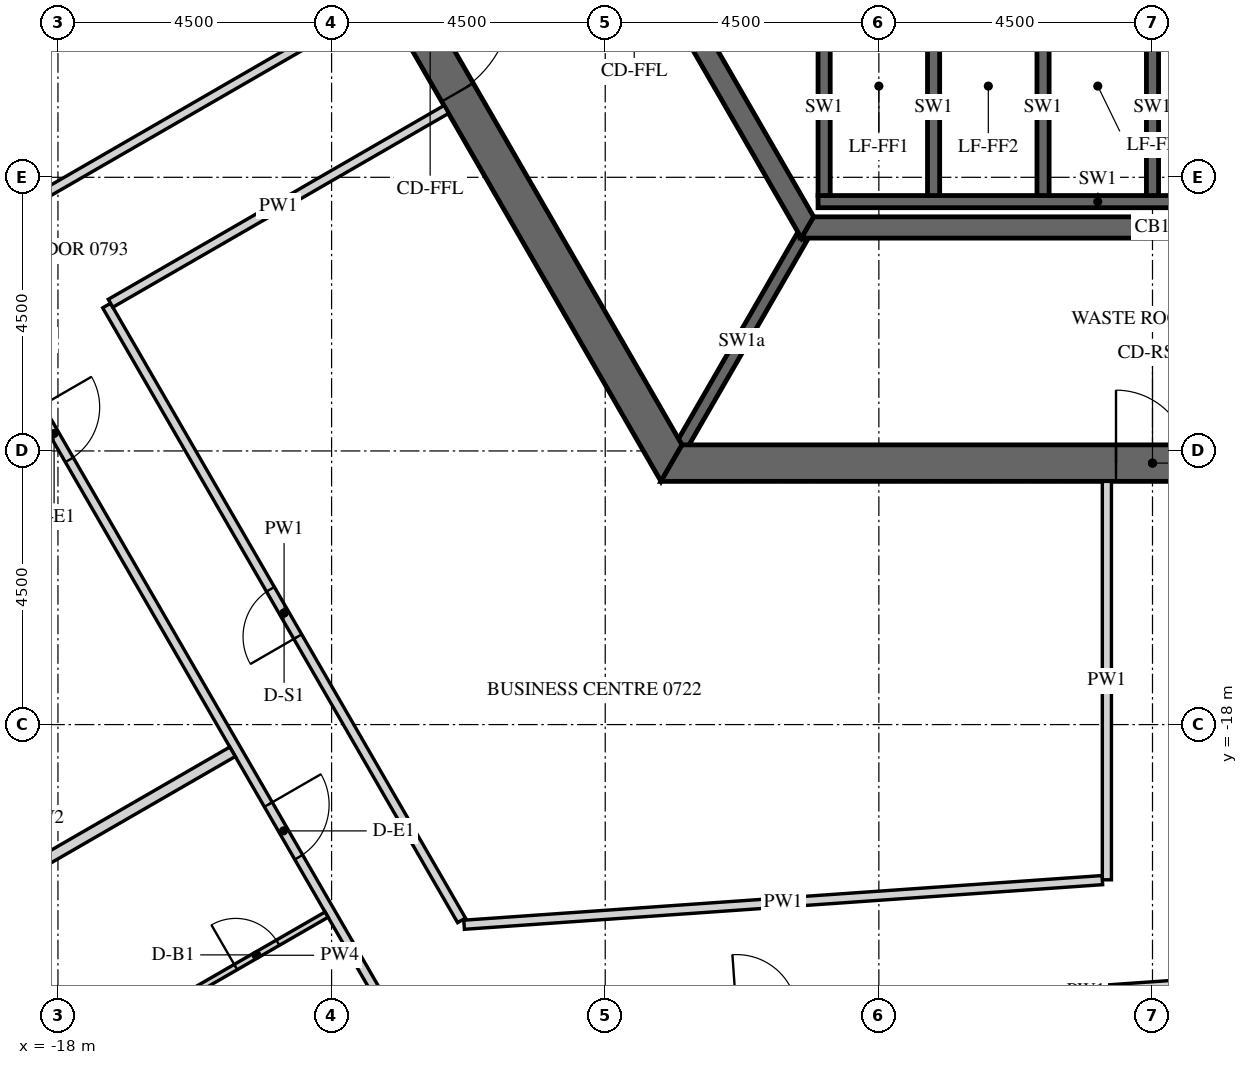
"""IFC4 building model, lengths in metres.
Left out: names, types, materials, properties, quantities, classifications, styles, units other than length and angle.
Written with IfcOpenShell. Run it as: python <this file> out.ifc"""

import sys

from ifc_helpers import new_model, si_unit, direction, frame, frame_2d, origin, place, context, subcontext, project, spatial, polyline, rectangle, outline, extrude, element, fill, save


model = new_model("IFC4")
c1 = context("Model", 3, precision=1e-05, world=origin(), true_north=direction((0.0, 1.0)))
c2 = subcontext(c1, "Body", "Model", "MODEL_VIEW")
j1 = project(units=[si_unit("LENGTHUNIT", "METRE"), si_unit("PLANEANGLEUNIT", "RADIAN")], contexts=[c1])
p1 = place(None, origin())
s1 = spatial("IfcSite", under=j1, at=p1, CompositionType="ELEMENT")
p2 = place(p1, origin())
s2 = spatial("IfcBuilding", under=s1, at=p2, CompositionType="ELEMENT")
p3 = place(p2, frame((0.0, 0.0, 99.9)))
s3 = spatial("IfcBuildingStorey", under=s2, at=p3, CompositionType="ELEMENT", Elevation=99.9)
p4 = place(p3, frame((-32.655, -2.89, -0.15), z_axis=(0.0, 0.0, 1.0), x_axis=(0.499997711317, -0.866026725152, 0.0)))
e1 = element("IfcWall", 1, at=p4, inside=s3, PredefinedType="SOLIDWALL", context=c2, shape_type="SweptSolid", body=[
    extrude(outline(polyline([(-0.022, -0.275), (30.097, -0.275), (30.045, 0.275), (0.022, 0.275), (-0.022, -0.275)])), origin(), (0.0, 0.0, 1.0), 3.9),
])
p5 = place(p4, frame((1.236, 0.0, 1.05)))
e2 = element("IfcOpeningElement", 2, at=p5, cuts=e1, PredefinedType="OPENING", context=c2, shape_type="SweptSolid", body=[
    extrude(rectangle(XDim=2.4, YDim=2.4, at=frame_2d((1.2, 1.2))), frame((0.0, 0.285, 0.0), z_axis=(0.0, -1.0, 0.0), x_axis=(1.0, 0.0, 0.0)), (0.0, 0.0, 1.0), 0.57),
])
p6 = place(p4, frame((4.835, 0.0, 1.05)))
e3 = element("IfcOpeningElement", 3, at=p6, cuts=e1, PredefinedType="OPENING", context=c2, shape_type="SweptSolid", body=[
    extrude(rectangle(XDim=2.4, YDim=2.4, at=frame_2d((1.2, 1.2))), frame((0.0, 0.285, 0.0), z_axis=(0.0, -1.0, 0.0), x_axis=(1.0, 0.0, 0.0)), (0.0, 0.0, 1.0), 0.57),
])
p7 = place(p4, frame((8.436, 0.0, 1.05)))
e4 = element("IfcOpeningElement", 4, at=p7, cuts=e1, PredefinedType="OPENING", context=c2, shape_type="SweptSolid", body=[
    extrude(rectangle(XDim=2.4, YDim=2.4, at=frame_2d((1.2, 1.2))), frame((0.0, 0.285, 0.0), z_axis=(0.0, -1.0, 0.0), x_axis=(1.0, 0.0, 0.0)), (0.0, 0.0, 1.0), 0.57),
])
p8 = place(p4, frame((12.035, 0.0, 1.05)))
e5 = element("IfcOpeningElement", 5, at=p8, cuts=e1, PredefinedType="OPENING", context=c2, shape_type="SweptSolid", body=[
    extrude(rectangle(XDim=2.4, YDim=2.4, at=frame_2d((1.2, 1.2))), frame((0.0, 0.285, 0.0), z_axis=(0.0, -1.0, 0.0), x_axis=(1.0, 0.0, 0.0)), (0.0, 0.0, 1.0), 0.57),
])
p9 = place(p4, frame((15.635, 0.0, 1.05)))
e6 = element("IfcOpeningElement", 6, at=p9, cuts=e1, PredefinedType="OPENING", context=c2, shape_type="SweptSolid", body=[
    extrude(rectangle(XDim=2.4, YDim=2.4, at=frame_2d((1.2, 1.2))), frame((0.0, 0.285, 0.0), z_axis=(0.0, -1.0, 0.0), x_axis=(1.0, 0.0, 0.0)), (0.0, 0.0, 1.0), 0.57),
])
p10 = place(p4, frame((19.236, 0.0, 1.05)))
e7 = element("IfcOpeningElement", 7, at=p10, cuts=e1, PredefinedType="OPENING", context=c2, shape_type="SweptSolid", body=[
    extrude(rectangle(XDim=2.4, YDim=2.4, at=frame_2d((1.2, 1.2))), frame((0.0, 0.285, 0.0), z_axis=(0.0, -1.0, 0.0), x_axis=(1.0, 0.0, 0.0)), (0.0, 0.0, 1.0), 0.57),
])
p11 = place(p4, frame((22.835, 0.0, 1.05)))
e8 = element("IfcOpeningElement", 8, at=p11, cuts=e1, PredefinedType="OPENING", context=c2, shape_type="SweptSolid", body=[
    extrude(rectangle(XDim=2.4, YDim=2.4, at=frame_2d((1.2, 1.2))), frame((0.0, 0.285, 0.0), z_axis=(0.0, -1.0, 0.0), x_axis=(1.0, 0.0, 0.0)), (0.0, 0.0, 1.0), 0.57),
])
p12 = place(p4, frame((26.436, 0.0, 1.05)))
e9 = element("IfcOpeningElement", 9, at=p12, cuts=e1, PredefinedType="OPENING", context=c2, shape_type="SweptSolid", body=[
    extrude(rectangle(XDim=2.4, YDim=2.4, at=frame_2d((1.2, 1.2))), frame((0.0, 0.285, 0.0), z_axis=(0.0, -1.0, 0.0), x_axis=(1.0, 0.0, 0.0)), (0.0, 0.0, 1.0), 0.57),
])
p13 = place(p3, frame((-15.819, 0.0, -0.15), z_axis=(0.0, 0.0, 1.0), x_axis=(0.499999880136, -0.866025472988, 0.0)))
e10 = element("IfcWall", 10, at=p13, inside=s3, PredefinedType="SHEAR", context=c2, shape_type="SweptSolid", body=[
    extrude(outline(polyline([(-0.173, -0.3), (15.993, -0.3), (15.646, 0.3), (0.173, 0.3), (-0.173, -0.3)])), origin(), (0.0, 0.0, 1.0), 3.9),
])
p14 = place(p13, frame((6.981, 0.0, 0.15)))
e11 = element("IfcOpeningElement", 11, at=p14, cuts=e10, PredefinedType="OPENING", context=c2, shape_type="SweptSolid", body=[
    extrude(rectangle(XDim=1.8, YDim=2.4, at=frame_2d((0.9, 1.2))), frame((0.0, 0.31, 0.0), z_axis=(0.0, -1.0, 0.0), x_axis=(1.0, 0.0, 0.0)), (0.0, 0.0, 1.0), 0.62),
])
p15 = place(p3, frame((-7.91, -13.7, -0.15), z_axis=(0.0, 0.0, 1.0), x_axis=(1.0, 0.0, 0.0)))
e12 = element("IfcWall", 12, at=p15, inside=s3, PredefinedType="SHEAR", context=c2, shape_type="SweptSolid", body=[
    extrude(outline(polyline([(-0.173, -0.3), (15.993, -0.3), (15.646, 0.3), (0.173, 0.3), (-0.173, -0.3)])), origin(), (0.0, 0.0, 1.0), 3.9),
])
p16 = place(p15, frame((7.31, 0.0, 0.15)))
e13 = element("IfcOpeningElement", 13, at=p16, cuts=e12, PredefinedType="OPENING", context=c2, shape_type="SweptSolid", body=[
    extrude(rectangle(XDim=1.2, YDim=2.4, at=frame_2d((0.6, 1.2))), frame((0.0, 0.31, 0.0), z_axis=(0.0, -1.0, 0.0), x_axis=(1.0, 0.0, 0.0)), (0.0, 0.0, 1.0), 0.62),
])
p17 = place(p3, frame((-11.345, 0.0, -0.15), z_axis=(0.0, 0.0, 1.0), x_axis=(0.499995046907, -0.866028263435, 0.0)))
e14 = element("IfcWall", 14, at=p17, inside=s3, PredefinedType="SHEAR", context=c2, shape_type="SweptSolid", body=[
    extrude(outline(polyline([(-0.101, -0.175), (11.446, -0.175), (11.244, 0.175), (0.101, 0.175), (-0.101, -0.175)])), origin(), (0.0, 0.0, 1.0), 3.9),
])
p18 = place(p17, frame((4.744, 0.0, 0.15)))
e15 = element("IfcOpeningElement", 15, at=p18, cuts=e14, PredefinedType="OPENING", context=c2, shape_type="SweptSolid", body=[
    extrude(rectangle(XDim=1.8, YDim=2.4, at=frame_2d((0.9, 1.2))), frame((0.0, 0.185, 0.0), z_axis=(0.0, -1.0, 0.0), x_axis=(1.0, 0.0, 0.0)), (0.0, 0.0, 1.0), 0.37),
])
p19 = place(p3, frame((-5.673, -9.825, -0.15), z_axis=(0.0, 0.0, 1.0), x_axis=(1.0, 0.0, 0.0)))
e16 = element("IfcWall", 16, at=p19, inside=s3, PredefinedType="SHEAR", context=c2, shape_type="SweptSolid", body=[
    extrude(outline(polyline([(-0.101, -0.175), (11.446, -0.175), (11.244, 0.175), (0.101, 0.175), (-0.101, -0.175)])), origin(), (0.0, 0.0, 1.0), 3.9),
])
p20 = place(p3, frame((-5.5, -9.4, -0.25), z_axis=(0.0, 0.0, 1.0), x_axis=(1.0, 0.0, 0.0)))
e17 = element("IfcWall", 17, at=p20, inside=s3, PredefinedType="SHEAR", context=c2, shape_type="SweptSolid", body=[
    extrude(rectangle(XDim=9.2, YDim=0.2, at=frame_2d((4.6, 0.0))), origin(), (0.0, 0.0, 1.0), 3.9),
])
for number, where, z_axis, x_axis in (
    (18, (-5.4, -9.3, -0.25), (0.0, 0.0, 1.0), (0.0, 1.0, 0.0)),
    (19, (-3.6, -9.3, -0.25), (0.0, 0.0, 1.0), (0.0, 1.0, 0.0)),
    (20, (-1.8, -9.3, -0.25), (0.0, 0.0, 1.0), (0.0, 1.0, 0.0)),
    (21, (0.0, -9.3, -0.25), (0.0, 0.0, 1.0), (0.0, 1.0, 0.0)),
):
    element("IfcWall", number, at=place(p3, frame(where, z_axis=z_axis, x_axis=x_axis)), inside=s3, PredefinedType="SHEAR", context=c2, shape_type="SweptSolid", body=[
        extrude(rectangle(XDim=2.9, YDim=0.2, at=frame_2d((1.45, 0.0))), origin(), (0.0, 0.0, 1.0), 3.9),
    ])
p21 = place(p3, frame((-5.773, -10.0, -0.15), z_axis=(0.0, 0.0, 1.0), x_axis=(-0.500038251005, -0.86600331843, 0.0)))
e22 = element("IfcWall", 22, at=p21, inside=s3, PredefinedType="SHEAR", context=c2, shape_type="SweptSolid", body=[
    extrude(rectangle(XDim=3.926, YDim=0.2, at=frame_2d((1.963, 0.0))), origin(), (0.0, 0.0, 1.0), 3.9),
])
p22 = place(p3, frame((-24.436, -2.175, 0.0), z_axis=(0.0, 0.0, 1.0), x_axis=(0.499996816197, -0.866027241946, 0.0)))
e23 = element("IfcWall", 23, at=p22, inside=s3, PredefinedType="PARTITIONING", context=c2, shape_type="SweptSolid", body=[
    extrude(rectangle(XDim=24.238, YDim=0.15, at=frame_2d((12.119, 0.0))), origin(), (0.0, 0.0, 1.0), 2.988),
])
p23 = place(p22, frame((0.179, 0.0, 0.0)))
e24 = element("IfcOpeningElement", 24, at=p23, cuts=e23, PredefinedType="OPENING", context=c2, shape_type="SweptSolid", body=[
    extrude(rectangle(XDim=1.0, YDim=2.1, at=frame_2d((0.5, 1.05))), frame((0.0, 0.085, 0.0), z_axis=(0.0, -1.0, 0.0), x_axis=(1.0, 0.0, 0.0)), (0.0, 0.0, 1.0), 0.17),
])
p24 = place(p22, frame((12.246, 0.0, 0.0)))
e25 = element("IfcOpeningElement", 25, at=p24, cuts=e23, PredefinedType="OPENING", context=c2, shape_type="SweptSolid", body=[
    extrude(rectangle(XDim=1.0, YDim=2.1, at=frame_2d((0.5, 1.05))), frame((0.0, 0.085, 0.0), z_axis=(0.0, -1.0, 0.0), x_axis=(1.0, 0.0, 0.0)), (0.0, 0.0, 1.0), 0.17),
])
p25 = place(p22, frame((19.792, 0.0, 0.0)))
e26 = element("IfcOpeningElement", 26, at=p25, cuts=e23, PredefinedType="OPENING", context=c2, shape_type="SweptSolid", body=[
    extrude(rectangle(XDim=1.0, YDim=2.1, at=frame_2d((0.5, 1.05))), frame((0.0, 0.085, 0.0), z_axis=(0.0, -1.0, 0.0), x_axis=(1.0, 0.0, 0.0)), (0.0, 0.0, 1.0), 0.17),
])
p26 = place(p3, frame((-12.234, -23.16, 0.0), z_axis=(0.0, 0.0, 1.0), x_axis=(0.997563845372, 0.069759403714, 0.0)))
e27 = element("IfcWall", 27, at=p26, inside=s3, PredefinedType="PARTITIONING", context=c2, shape_type="SweptSolid", body=[
    extrude(rectangle(XDim=22.335, YDim=0.15, at=frame_2d((11.168, 0.0))), origin(), (0.0, 0.0, 1.0), 2.988),
])
p27 = place(p26, frame((5.409, 0.0, 0.0)))
e28 = element("IfcOpeningElement", 28, at=p27, cuts=e27, PredefinedType="OPENING", context=c2, shape_type="SweptSolid", body=[
    extrude(rectangle(XDim=1.0, YDim=2.1, at=frame_2d((0.5, 1.05))), frame((0.0, 0.085, 0.0), z_axis=(0.0, -1.0, 0.0), x_axis=(1.0, 0.0, 0.0)), (0.0, 0.0, 1.0), 0.17),
])
p28 = place(p26, frame((18.272, 0.0, 0.0)))
e29 = element("IfcOpeningElement", 29, at=p28, cuts=e27, PredefinedType="OPENING", context=c2, shape_type="SweptSolid", body=[
    extrude(rectangle(XDim=1.0, YDim=2.1, at=frame_2d((0.5, 1.05))), frame((0.0, 0.085, 0.0), z_axis=(0.0, -1.0, 0.0), x_axis=(1.0, 0.0, 0.0)), (0.0, 0.0, 1.0), 0.17),
])
p29 = place(p3, frame((-12.664, -6.066, 0.0), z_axis=(0.0, 0.0, 1.0), x_axis=(-0.866021702275, -0.500006411147, 0.0)))
e30 = element("IfcWall", 30, at=p29, inside=s3, PredefinedType="PARTITIONING", context=c2, shape_type="SweptSolid", body=[
    extrude(rectangle(XDim=6.45, YDim=0.15, at=frame_2d((3.225, 0.0))), origin(), (0.0, 0.0, 1.0), 2.988),
])
p30 = place(p3, frame((-0.75, -14.0, 0.0), z_axis=(0.0, 0.0, 1.0), x_axis=(0.0, -1.0, 0.0)))
e31 = element("IfcWall", 31, at=p30, inside=s3, PredefinedType="PARTITIONING", context=c2, shape_type="SweptSolid", body=[
    extrude(rectangle(XDim=6.552, YDim=0.15, at=frame_2d((3.276, 0.0))), origin(), (0.0, 0.0, 1.0), 2.988),
])
p31 = place(p3, frame((-0.825, -20.558, 0.0), z_axis=(0.0, 0.0, 1.0), x_axis=(-0.997564524135, -0.069749696677, 0.0)))
e32 = element("IfcWall", 32, at=p31, inside=s3, PredefinedType="PARTITIONING", context=c2, shape_type="SweptSolid", body=[
    extrude(rectangle(XDim=10.522, YDim=0.15, at=frame_2d((5.261, 0.0))), origin(), (0.0, 0.0, 1.0), 2.988),
])
p32 = place(p3, frame((-11.363, -21.219, 0.0), z_axis=(0.0, 0.0, 1.0), x_axis=(-0.50001451402, 0.866017023949, 0.0)))
e33 = element("IfcWall", 33, at=p32, inside=s3, PredefinedType="PARTITIONING", context=c2, shape_type="SweptSolid", body=[
    extrude(rectangle(XDim=11.674, YDim=0.15, at=frame_2d((5.837, 0.0))), origin(), (0.0, 0.0, 1.0), 2.988),
])
p33 = place(p32, frame((5.387, 0.0, 0.0)))
e34 = element("IfcOpeningElement", 34, at=p33, cuts=e33, PredefinedType="OPENING", context=c2, shape_type="SweptSolid", body=[
    extrude(rectangle(XDim=0.9, YDim=2.1, at=frame_2d((0.45, 1.05))), frame((0.0, 0.085, 0.0), z_axis=(0.0, -1.0, 0.0), x_axis=(1.0, 0.0, 0.0)), (0.0, 0.0, 1.0), 0.17),
])
p34 = place(p3, frame((-17.135, -11.072, 0.0), z_axis=(0.0, 0.0, 1.0), x_axis=(0.866028703517, 0.499994284652, 0.0)))
e35 = element("IfcWall", 35, at=p34, inside=s3, PredefinedType="PARTITIONING", context=c2, shape_type="SweptSolid", body=[
    extrude(rectangle(XDim=6.375, YDim=0.15, at=frame_2d((3.188, 0.0))), origin(), (0.0, 0.0, 1.0), 2.988),
])
p35 = place(p3, frame((-21.299, -22.009, 0.0), z_axis=(0.0, 0.0, 1.0), x_axis=(0.866024672353, 0.500001266874, 0.0)))
e36 = element("IfcWall", 36, at=p35, inside=s3, PredefinedType="PARTITIONING", context=c2, shape_type="SweptSolid", body=[
    extrude(rectangle(XDim=7.125, YDim=0.18, at=frame_2d((3.562, 0.0))), origin(), (0.0, 0.0, 1.0), 2.988),
])
p36 = place(p3, frame((-15.899, -22.462, 0.0), z_axis=(0.0, 0.0, 1.0), x_axis=(0.86604424267, 0.499967368674, 0.0)))
e37 = element("IfcWall", 37, at=p36, inside=s3, PredefinedType="PARTITIONING", context=c2, shape_type="SweptSolid", body=[
    extrude(rectangle(XDim=2.675, YDim=0.1, at=frame_2d((1.337, 0.0))), origin(), (0.0, 0.0, 1.0), 2.988),
])
p37 = place(p36, frame((0.95, 0.0, 0.0)))
e38 = element("IfcOpeningElement", 38, at=p37, cuts=e37, PredefinedType="OPENING", context=c2, shape_type="SweptSolid", body=[
    extrude(rectangle(XDim=0.8, YDim=2.1, at=frame_2d((0.4, 1.05))), frame((0.0, 0.06, 0.0), z_axis=(0.0, -1.0, 0.0), x_axis=(1.0, 0.0, 0.0)), (0.0, 0.0, 1.0), 0.12),
])
p38 = place(p14, origin())
e39 = element("IfcDoor", 39, at=p38, inside=s3, OperationType="DOUBLE_DOOR_SINGLE_SWING", PredefinedType="DOOR", context=c2, shape_type="SweptSolid", body=[
    extrude(rectangle(XDim=1.8, YDim=2.4, at=frame_2d((0.9, 1.2))), frame((0.0, 0.025, 0.0), z_axis=(0.0, -1.0, 0.0), x_axis=(1.0, 0.0, 0.0)), (0.0, 0.0, 1.0), 0.05),
])
fill(e11, e39)
p39 = place(p16, origin())
e40 = element("IfcDoor", 40, at=p39, inside=s3, OperationType="SINGLE_SWING_LEFT", PredefinedType="DOOR", context=c2, shape_type="SweptSolid", body=[
    extrude(rectangle(XDim=1.2, YDim=2.4, at=frame_2d((0.6, 1.2))), frame((0.0, 0.025, 0.0), z_axis=(0.0, -1.0, 0.0), x_axis=(1.0, 0.0, 0.0)), (0.0, 0.0, 1.0), 0.05),
])
fill(e13, e40)
p40 = place(p24, origin())
e41 = element("IfcDoor", 41, at=p40, inside=s3, OperationType="SINGLE_SWING_RIGHT", PredefinedType="DOOR", context=c2, shape_type="SweptSolid", body=[
    extrude(rectangle(XDim=1.0, YDim=2.1, at=frame_2d((0.5, 1.05))), frame((0.0, 0.025, 0.0), z_axis=(0.0, -1.0, 0.0), x_axis=(1.0, 0.0, 0.0)), (0.0, 0.0, 1.0), 0.05),
])
fill(e25, e41)
p41 = place(p25, origin())
e42 = element("IfcDoor", 42, at=p41, inside=s3, OperationType="SINGLE_SWING_RIGHT", PredefinedType="DOOR", context=c2, shape_type="SweptSolid", body=[
    extrude(rectangle(XDim=1.0, YDim=2.1, at=frame_2d((0.5, 1.05))), frame((0.0, 0.025, 0.0), z_axis=(0.0, -1.0, 0.0), x_axis=(1.0, 0.0, 0.0)), (0.0, 0.0, 1.0), 0.05),
])
fill(e26, e42)
p42 = place(p37, origin())
e43 = element("IfcDoor", 43, at=p42, inside=s3, OperationType="SINGLE_SWING_RIGHT", PredefinedType="DOOR", context=c2, shape_type="SweptSolid", body=[
    extrude(rectangle(XDim=0.8, YDim=2.1, at=frame_2d((0.4, 1.05))), frame((0.0, 0.025, 0.0), z_axis=(0.0, -1.0, 0.0), x_axis=(1.0, 0.0, 0.0)), (0.0, 0.0, 1.0), 0.05),
])
fill(e38, e43)
p43 = place(p33, origin())
e44 = element("IfcDoor", 44, at=p43, inside=s3, OperationType="SINGLE_SWING_RIGHT", PredefinedType="DOOR", context=c2, shape_type="SweptSolid", body=[
    extrude(rectangle(XDim=0.9, YDim=2.1, at=frame_2d((0.45, 1.05))), frame((0.0, 0.025, 0.0), z_axis=(0.0, -1.0, 0.0), x_axis=(1.0, 0.0, 0.0)), (0.0, 0.0, 1.0), 0.05),
])
fill(e34, e44)
save(model, sys.argv[1])
